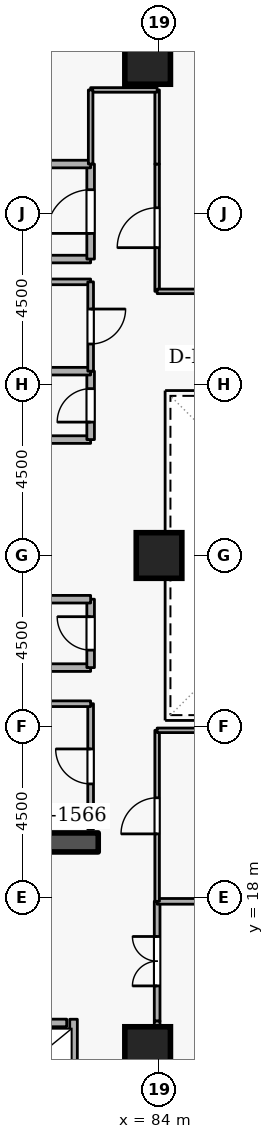
"""IFC4 building model, lengths in metres.
Left out: names, types, materials, properties, quantities, classifications, styles, units other than length and angle.
Written with IfcOpenShell. Run it as: python <this file> out.ifc"""

import sys

from ifc_helpers import new_model, si_unit, direction, frame, frame_2d, origin, origin_2d, place, context, subcontext, project, spatial, rectangle, extrude, element, fill, save


model = new_model("IFC4")
c1 = context("Model", 3, precision=1e-05, world=origin(), true_north=direction((0.0, 1.0)))
c2 = subcontext(c1, "Body", "Model", "MODEL_VIEW")
j1 = project(units=[si_unit("LENGTHUNIT", "METRE"), si_unit("PLANEANGLEUNIT", "RADIAN")], contexts=[c1])
p1 = place(None, origin())
s1 = spatial("IfcSite", under=j1, at=p1, CompositionType="ELEMENT")
p2 = place(p1, origin())
s2 = spatial("IfcBuilding", under=s1, at=p2, CompositionType="ELEMENT")
p3 = place(p2, frame((0.0, 0.0, 130.5)))
s3 = spatial("IfcBuildingStorey", under=s2, at=p3, CompositionType="ELEMENT", Elevation=130.5)
p4 = place(p3, frame((76.6, 19.45, 0.0), z_axis=(0.0, 0.0, 1.0), x_axis=(1.0, 0.0, 0.0)))
e1 = element("IfcWall", 1, at=p4, inside=s3, PredefinedType="SHEAR", context=c2, shape_type="SweptSolid", body=[
    extrude(rectangle(XDim=5.8, YDim=0.5, at=frame_2d((2.9, 0.0))), origin(), (0.0, 0.0, 1.0), 3.6),
])
for number, where, z_axis, x_axis in (
    (2, (83.7, 14.0, 0.0), (0.0, 0.0, 1.0), (1.0, 0.0, 0.0)),
    (3, (83.7, 40.0, 0.0), (0.0, 0.0, 1.0), (1.0, 0.0, 0.0)),
    (4, (84.0, 27.0, 0.0), (0.0, 0.0, 1.0), (1.0, 0.0, 0.0)),
):
    element("IfcColumn", number, at=place(p3, frame(where, z_axis=z_axis, x_axis=x_axis)), inside=s3, PredefinedType="COLUMN", context=c2, shape_type="SweptSolid", body=[
        extrude(rectangle(XDim=1.2, YDim=1.2, at=origin_2d()), origin(), (0.0, 0.0, 1.0), 3.6),
    ])
p5 = place(p3, frame((79.63, 14.7, 0.0), z_axis=(0.0, 0.0, 1.0), x_axis=(1.0, 0.0, 0.0)))
e5 = element("IfcWall", 5, at=p5, inside=s3, PredefinedType="STANDARD", context=c2, shape_type="SweptSolid", body=[
    extrude(rectangle(XDim=1.94, YDim=0.2, at=frame_2d((0.97, 0.0))), origin(), (0.0, 0.0, 1.0), 3.34),
])
p6 = place(p5, frame((0.46, 0.0, 0.0)))
e6 = element("IfcOpeningElement", 6, at=p6, cuts=e5, PredefinedType="OPENING", context=c2, shape_type="SweptSolid", body=[
    extrude(rectangle(XDim=1.02, YDim=2.06, at=frame_2d((0.51, 1.03))), frame((0.0, 0.11, 0.0), z_axis=(0.0, -1.0, 0.0), x_axis=(1.0, 0.0, 0.0)), (0.0, 0.0, 1.0), 0.22),
])
p7 = place(p3, frame((81.75, 12.612, 0.0), z_axis=(0.0, 0.0, 1.0), x_axis=(0.0, 1.0, 0.0)))
e7 = element("IfcWall", 7, at=p7, inside=s3, PredefinedType="STANDARD", context=c2, shape_type="SweptSolid", body=[
    extrude(rectangle(XDim=2.186, YDim=0.2, at=frame_2d((1.093, 0.0))), origin(), (0.0, 0.0, 1.0), 3.34),
])
p8 = place(p3, frame((79.9, 34.8, 0.0), z_axis=(0.0, 0.0, 1.0), x_axis=(1.0, 0.0, 0.0)))
e8 = element("IfcWall", 8, at=p8, inside=s3, PredefinedType="STANDARD", context=c2, shape_type="SweptSolid", body=[
    extrude(rectangle(XDim=2.3, YDim=0.2, at=frame_2d((1.15, 0.0))), origin(), (0.0, 0.0, 1.0), 2.545),
])
p9 = place(p3, frame((82.2, 34.8, 0.0), z_axis=(0.0, 0.0, 1.0), x_axis=(0.0, 1.0, 0.0)))
e9 = element("IfcWall", 9, at=p9, inside=s3, PredefinedType="STANDARD", context=c2, shape_type="SweptSolid", body=[
    extrude(rectangle(XDim=2.5, YDim=0.2, at=frame_2d((1.25, 0.0))), origin(), (0.0, 0.0, 1.0), 3.34),
])
p10 = place(p9, frame((0.675, 0.0, 0.0)))
e10 = element("IfcOpeningElement", 10, at=p10, cuts=e9, PredefinedType="OPENING", context=c2, shape_type="SweptSolid", body=[
    extrude(rectangle(XDim=1.15, YDim=2.1, at=frame_2d((0.575, 1.05))), frame((0.0, 0.11, 0.0), z_axis=(0.0, -1.0, 0.0), x_axis=(1.0, 0.0, 0.0)), (0.0, 0.0, 1.0), 0.22),
])
p11 = place(p3, frame((82.2, 37.3, 0.0), z_axis=(0.0, 0.0, 1.0), x_axis=(-1.0, 0.0, 0.0)))
e11 = element("IfcWall", 11, at=p11, inside=s3, PredefinedType="STANDARD", context=c2, shape_type="SweptSolid", body=[
    extrude(rectangle(XDim=5.7, YDim=0.2, at=frame_2d((2.85, 0.0))), origin(), (0.0, 0.0, 1.0), 3.34),
])
p12 = place(p3, frame((80.15, 24.05, 0.0), z_axis=(0.0, 0.0, 1.0), x_axis=(1.0, 0.0, 0.0)))
e12 = element("IfcWall", 12, at=p12, inside=s3, PredefinedType="STANDARD", context=c2, shape_type="SweptSolid", body=[
    extrude(rectangle(XDim=2.05, YDim=0.2, at=frame_2d((1.025, 0.0))), origin(), (0.0, 0.0, 1.0), 3.34),
])
p13 = place(p3, frame((82.2, 24.05, 0.0), z_axis=(0.0, 0.0, 1.0), x_axis=(0.0, 1.0, 0.0)))
e13 = element("IfcWall", 13, at=p13, inside=s3, PredefinedType="STANDARD", context=c2, shape_type="SweptSolid", body=[
    extrude(rectangle(XDim=1.8, YDim=0.2, at=frame_2d((0.9, 0.0))), origin(), (0.0, 0.0, 1.0), 3.34),
])
p14 = place(p13, frame((0.46, 0.0, 0.0)))
e14 = element("IfcOpeningElement", 14, at=p14, cuts=e13, PredefinedType="OPENING", context=c2, shape_type="SweptSolid", body=[
    extrude(rectangle(XDim=0.88, YDim=2.04, at=frame_2d((0.44, 1.02))), frame((0.0, 0.11, 0.0), z_axis=(0.0, -1.0, 0.0), x_axis=(1.0, 0.0, 0.0)), (0.0, 0.0, 1.0), 0.22),
])
for number, where, z_axis, x_axis in (
    (15, (82.2, 25.85, 0.0), (0.0, 0.0, 1.0), (-1.0, 0.0, 0.0)),
    (16, (80.15, 30.05, 0.0), (0.0, 0.0, 1.0), (1.0, 0.0, 0.0)),
):
    element("IfcWall", number, at=place(p3, frame(where, z_axis=z_axis, x_axis=x_axis)), inside=s3, PredefinedType="STANDARD", context=c2, shape_type="SweptSolid", body=[
        extrude(rectangle(XDim=2.05, YDim=0.2, at=frame_2d((1.025, 0.0))), origin(), (0.0, 0.0, 1.0), 3.34),
    ])
p15 = place(p3, frame((82.2, 30.05, 0.0), z_axis=(0.0, 0.0, 1.0), x_axis=(0.0, 1.0, 0.0)))
e17 = element("IfcWall", 17, at=p15, inside=s3, PredefinedType="STANDARD", context=c2, shape_type="SweptSolid", body=[
    extrude(rectangle(XDim=1.8, YDim=0.2, at=frame_2d((0.9, 0.0))), origin(), (0.0, 0.0, 1.0), 3.34),
])
p16 = place(p15, frame((0.46, 0.0, 0.0)))
e18 = element("IfcOpeningElement", 18, at=p16, cuts=e17, PredefinedType="OPENING", context=c2, shape_type="SweptSolid", body=[
    extrude(rectangle(XDim=0.88, YDim=2.04, at=frame_2d((0.44, 1.02))), frame((0.0, 0.11, 0.0), z_axis=(0.0, -1.0, 0.0), x_axis=(1.0, 0.0, 0.0)), (0.0, 0.0, 1.0), 0.22),
])
p17 = place(p3, frame((82.2, 31.85, 0.0), z_axis=(0.0, 0.0, 1.0), x_axis=(-1.0, 0.0, 0.0)))
e19 = element("IfcWall", 19, at=p17, inside=s3, PredefinedType="STANDARD", context=c2, shape_type="SweptSolid", body=[
    extrude(rectangle(XDim=2.05, YDim=0.2, at=frame_2d((1.025, 0.0))), origin(), (0.0, 0.0, 1.0), 3.34),
])
p18 = place(p3, frame((82.2, 19.8, 0.0), z_axis=(0.0, 0.0, 1.0), x_axis=(0.0, 1.0, 0.0)))
e20 = element("IfcWall", 20, at=p18, inside=s3, PredefinedType="PARTITIONING", context=c2, shape_type="SweptSolid", body=[
    extrude(rectangle(XDim=3.3, YDim=0.15, at=frame_2d((1.65, 0.0))), origin(), (0.0, 0.0, 1.0), 3.34),
])
p19 = place(p18, frame((1.19, 0.0, 0.0)))
e21 = element("IfcOpeningElement", 21, at=p19, cuts=e20, PredefinedType="OPENING", context=c2, shape_type="SweptSolid", body=[
    extrude(rectangle(XDim=0.92, YDim=2.08, at=frame_2d((0.46, 1.04))), frame((0.0, 0.085, 0.0), z_axis=(0.0, -1.0, 0.0), x_axis=(1.0, 0.0, 0.0)), (0.0, 0.0, 1.0), 0.17),
])
p20 = place(p3, frame((82.2, 23.1, 0.0), z_axis=(0.0, 0.0, 1.0), x_axis=(-1.0, 0.0, 0.0)))
e22 = element("IfcWall", 22, at=p20, inside=s3, PredefinedType="PARTITIONING", context=c2, shape_type="SweptSolid", body=[
    extrude(rectangle(XDim=2.05, YDim=0.15, at=frame_2d((1.025, 0.0))), origin(), (0.0, 0.0, 1.0), 3.34),
])
p21 = place(p3, frame((80.15, 34.2, 0.0), z_axis=(0.0, 0.0, 1.0), x_axis=(1.0, 0.0, 0.0)))
e23 = element("IfcWall", 23, at=p21, inside=s3, PredefinedType="PARTITIONING", context=c2, shape_type="SweptSolid", body=[
    extrude(rectangle(XDim=2.05, YDim=0.15, at=frame_2d((1.025, 0.0))), origin(), (0.0, 0.0, 1.0), 2.545),
])
p22 = place(p3, frame((82.2, 34.2, 0.0), z_axis=(0.0, 0.0, 1.0), x_axis=(0.0, -1.0, 0.0)))
e24 = element("IfcWall", 24, at=p22, inside=s3, PredefinedType="PARTITIONING", context=c2, shape_type="SweptSolid", body=[
    extrude(rectangle(XDim=2.35, YDim=0.15, at=frame_2d((1.175, 0.0))), origin(), (0.0, 0.0, 1.0), 3.34),
])
p23 = place(p22, frame((0.715, 0.0, 0.0)))
e25 = element("IfcOpeningElement", 25, at=p23, cuts=e24, PredefinedType="OPENING", context=c2, shape_type="SweptSolid", body=[
    extrude(rectangle(XDim=0.92, YDim=2.08, at=frame_2d((0.46, 1.04))), frame((0.0, 0.085, 0.0), z_axis=(0.0, -1.0, 0.0), x_axis=(1.0, 0.0, 0.0)), (0.0, 0.0, 1.0), 0.17),
])
p24 = place(p3, frame((83.95, 14.75, 0.0), z_axis=(0.0, 0.0, 1.0), x_axis=(0.0, 1.0, 0.0)))
e26 = element("IfcWall", 26, at=p24, inside=s3, PredefinedType="PARTITIONING", context=c2, shape_type="SweptSolid", body=[
    extrude(rectangle(XDim=3.15, YDim=0.15, at=frame_2d((1.575, 0.0))), origin(), (0.0, 0.0, 1.0), 3.34),
])
p25 = place(p24, frame((0.925, 0.0, 0.0)))
e27 = element("IfcOpeningElement", 27, at=p25, cuts=e26, PredefinedType="OPENING", context=c2, shape_type="SweptSolid", body=[
    extrude(rectangle(XDim=1.3, YDim=2.12, at=frame_2d((0.65, 1.06))), frame((0.0, 0.085, 0.0), z_axis=(0.0, -1.0, 0.0), x_axis=(1.0, 0.0, 0.0)), (0.0, 0.0, 1.0), 0.17),
])
p26 = place(p3, frame((83.95, 17.9, 0.0), z_axis=(0.0, 0.0, 1.0), x_axis=(1.0, 0.0, 0.0)))
e28 = element("IfcWall", 28, at=p26, inside=s3, PredefinedType="PARTITIONING", context=c2, shape_type="SweptSolid", body=[
    extrude(rectangle(XDim=4.55, YDim=0.15, at=frame_2d((2.275, 0.0))), origin(), (0.0, 0.0, 1.0), 3.34),
])
p27 = place(p3, frame((83.95, 12.4, 0.0), z_axis=(0.0, 0.0, 1.0), x_axis=(0.0, 1.0, 0.0)))
e29 = element("IfcWall", 29, at=p27, inside=s3, PredefinedType="PARTITIONING", context=c2, shape_type="SweptSolid", body=[
    extrude(rectangle(XDim=2.35, YDim=0.15, at=frame_2d((1.175, 0.0))), origin(), (0.0, 0.0, 1.0), 3.34),
])
p28 = place(p3, frame((83.95, 17.9, 0.0), z_axis=(0.0, 0.0, 1.0), x_axis=(0.0, 1.0, 0.0)))
e30 = element("IfcWall", 30, at=p28, inside=s3, PredefinedType="PARTITIONING", context=c2, shape_type="SweptSolid", body=[
    extrude(rectangle(XDim=4.5, YDim=0.12, at=frame_2d((2.25, 0.0))), origin(), (0.0, 0.0, 1.0), 3.34),
])
p29 = place(p28, frame((1.775, 0.0, 0.0)))
e31 = element("IfcOpeningElement", 31, at=p29, cuts=e30, PredefinedType="OPENING", context=c2, shape_type="SweptSolid", body=[
    extrude(rectangle(XDim=0.95, YDim=2.1, at=frame_2d((0.475, 1.05))), frame((0.0, 0.07, 0.0), z_axis=(0.0, -1.0, 0.0), x_axis=(1.0, 0.0, 0.0)), (0.0, 0.0, 1.0), 0.14),
])
p30 = place(p3, frame((83.95, 22.4, 0.0), z_axis=(0.0, 0.0, 1.0), x_axis=(1.0, 0.0, 0.0)))
e32 = element("IfcWall", 32, at=p30, inside=s3, PredefinedType="PARTITIONING", context=c2, shape_type="SweptSolid", body=[
    extrude(rectangle(XDim=9.1, YDim=0.12, at=frame_2d((4.55, 0.0))), origin(), (0.0, 0.0, 1.0), 3.34),
])
p31 = place(p3, frame((83.95, 33.95, 0.0), z_axis=(0.0, 0.0, 1.0), x_axis=(0.0, 1.0, 0.0)))
e33 = element("IfcWall", 33, at=p31, inside=s3, PredefinedType="PARTITIONING", context=c2, shape_type="SweptSolid", body=[
    extrude(rectangle(XDim=3.35, YDim=0.12, at=frame_2d((1.675, 0.0))), origin(), (0.0, 0.0, 1.0), 3.34),
])
p32 = place(p31, frame((1.15, 0.0, 0.0)))
e34 = element("IfcOpeningElement", 34, at=p32, cuts=e33, PredefinedType="OPENING", context=c2, shape_type="SweptSolid", body=[
    extrude(rectangle(XDim=1.05, YDim=2.1, at=frame_2d((0.525, 1.05))), frame((0.0, 0.07, 0.0), z_axis=(0.0, -1.0, 0.0), x_axis=(1.0, 0.0, 0.0)), (0.0, 0.0, 1.0), 0.14),
])
p33 = place(p3, frame((83.95, 37.3, 0.0), z_axis=(0.0, 0.0, 1.0), x_axis=(0.0, 1.0, 0.0)))
e35 = element("IfcWall", 35, at=p33, inside=s3, PredefinedType="PARTITIONING", context=c2, shape_type="SweptSolid", body=[
    extrude(rectangle(XDim=1.95, YDim=0.12, at=frame_2d((0.975, 0.0))), origin(), (0.0, 0.0, 1.0), 3.34),
])
p34 = place(p3, frame((83.95, 39.25, 0.0), z_axis=(0.0, 0.0, 1.0), x_axis=(-1.0, 0.0, 0.0)))
e36 = element("IfcWall", 36, at=p34, inside=s3, PredefinedType="PARTITIONING", context=c2, shape_type="SweptSolid", body=[
    extrude(rectangle(XDim=1.75, YDim=0.12, at=frame_2d((0.875, 0.0))), origin(), (0.0, 0.0, 1.0), 3.34),
])
p35 = place(p3, frame((82.2, 39.25, 0.0), z_axis=(0.0, 0.0, 1.0), x_axis=(0.0, -1.0, 0.0)))
e37 = element("IfcWall", 37, at=p35, inside=s3, PredefinedType="PARTITIONING", context=c2, shape_type="SweptSolid", body=[
    extrude(rectangle(XDim=1.95, YDim=0.12, at=frame_2d((0.975, 0.0))), origin(), (0.0, 0.0, 1.0), 3.34),
])
p36 = place(p3, frame((86.25, 33.95, 0.0), z_axis=(0.0, 0.0, 1.0), x_axis=(-1.0, 0.0, 0.0)))
e38 = element("IfcWall", 38, at=p36, inside=s3, PredefinedType="PARTITIONING", context=c2, shape_type="SweptSolid", body=[
    extrude(rectangle(XDim=2.3, YDim=0.12, at=frame_2d((1.15, 0.0))), origin(), (0.0, 0.0, 1.0), 3.34),
])
p37 = place(p10, origin())
e39 = element("IfcDoor", 39, at=p37, inside=s3, OperationType="SINGLE_SWING_LEFT", PredefinedType="DOOR", context=c2, shape_type="SweptSolid", body=[
    extrude(rectangle(XDim=1.15, YDim=2.1, at=frame_2d((0.575, 1.05))), frame((0.0, 0.025, 0.0), z_axis=(0.0, -1.0, 0.0), x_axis=(1.0, 0.0, 0.0)), (0.0, 0.0, 1.0), 0.05),
])
fill(e10, e39)
p38 = place(p14, origin())
e40 = element("IfcDoor", 40, at=p38, inside=s3, OperationType="SINGLE_SWING_RIGHT", PredefinedType="DOOR", context=c2, shape_type="SweptSolid", body=[
    extrude(rectangle(XDim=0.88, YDim=2.04, at=frame_2d((0.44, 1.02))), frame((0.0, 0.025, 0.0), z_axis=(0.0, -1.0, 0.0), x_axis=(1.0, 0.0, 0.0)), (0.0, 0.0, 1.0), 0.05),
])
fill(e14, e40)
p39 = place(p16, origin())
e41 = element("IfcDoor", 41, at=p39, inside=s3, OperationType="SINGLE_SWING_LEFT", PredefinedType="DOOR", context=c2, shape_type="SweptSolid", body=[
    extrude(rectangle(XDim=0.88, YDim=2.04, at=frame_2d((0.44, 1.02))), frame((0.0, 0.025, 0.0), z_axis=(0.0, -1.0, 0.0), x_axis=(1.0, 0.0, 0.0)), (0.0, 0.0, 1.0), 0.05),
])
fill(e18, e41)
p40 = place(p19, origin())
e42 = element("IfcDoor", 42, at=p40, inside=s3, OperationType="SINGLE_SWING_RIGHT", PredefinedType="DOOR", context=c2, shape_type="SweptSolid", body=[
    extrude(rectangle(XDim=0.92, YDim=2.08, at=frame_2d((0.46, 1.04))), frame((0.0, 0.025, 0.0), z_axis=(0.0, -1.0, 0.0), x_axis=(1.0, 0.0, 0.0)), (0.0, 0.0, 1.0), 0.05),
])
fill(e21, e42)
p41 = place(p23, origin())
e43 = element("IfcDoor", 43, at=p41, inside=s3, OperationType="SINGLE_SWING_LEFT", PredefinedType="DOOR", context=c2, shape_type="SweptSolid", body=[
    extrude(rectangle(XDim=0.92, YDim=2.08, at=frame_2d((0.46, 1.04))), frame((0.0, 0.025, 0.0), z_axis=(0.0, -1.0, 0.0), x_axis=(1.0, 0.0, 0.0)), (0.0, 0.0, 1.0), 0.05),
])
fill(e25, e43)
p42 = place(p25, origin())
e44 = element("IfcDoor", 44, at=p42, inside=s3, OperationType="DOUBLE_DOOR_SINGLE_SWING", PredefinedType="DOOR", context=c2, shape_type="SweptSolid", body=[
    extrude(rectangle(XDim=1.3, YDim=2.12, at=frame_2d((0.65, 1.06))), frame((0.0, 0.025, 0.0), z_axis=(0.0, -1.0, 0.0), x_axis=(1.0, 0.0, 0.0)), (0.0, 0.0, 1.0), 0.05),
])
fill(e27, e44)
p43 = place(p29, origin())
e45 = element("IfcDoor", 45, at=p43, inside=s3, OperationType="SINGLE_SWING_LEFT", PredefinedType="DOOR", context=c2, shape_type="SweptSolid", body=[
    extrude(rectangle(XDim=0.95, YDim=2.1, at=frame_2d((0.475, 1.05))), frame((0.0, 0.025, 0.0), z_axis=(0.0, -1.0, 0.0), x_axis=(1.0, 0.0, 0.0)), (0.0, 0.0, 1.0), 0.05),
])
fill(e31, e45)
p44 = place(p32, origin())
e46 = element("IfcDoor", 46, at=p44, inside=s3, OperationType="SINGLE_SWING_LEFT", PredefinedType="DOOR", context=c2, shape_type="SweptSolid", body=[
    extrude(rectangle(XDim=1.05, YDim=2.1, at=frame_2d((0.525, 1.05))), frame((0.0, 0.025, 0.0), z_axis=(0.0, -1.0, 0.0), x_axis=(1.0, 0.0, 0.0)), (0.0, 0.0, 1.0), 0.05),
])
fill(e34, e46)
save(model, sys.argv[1])
